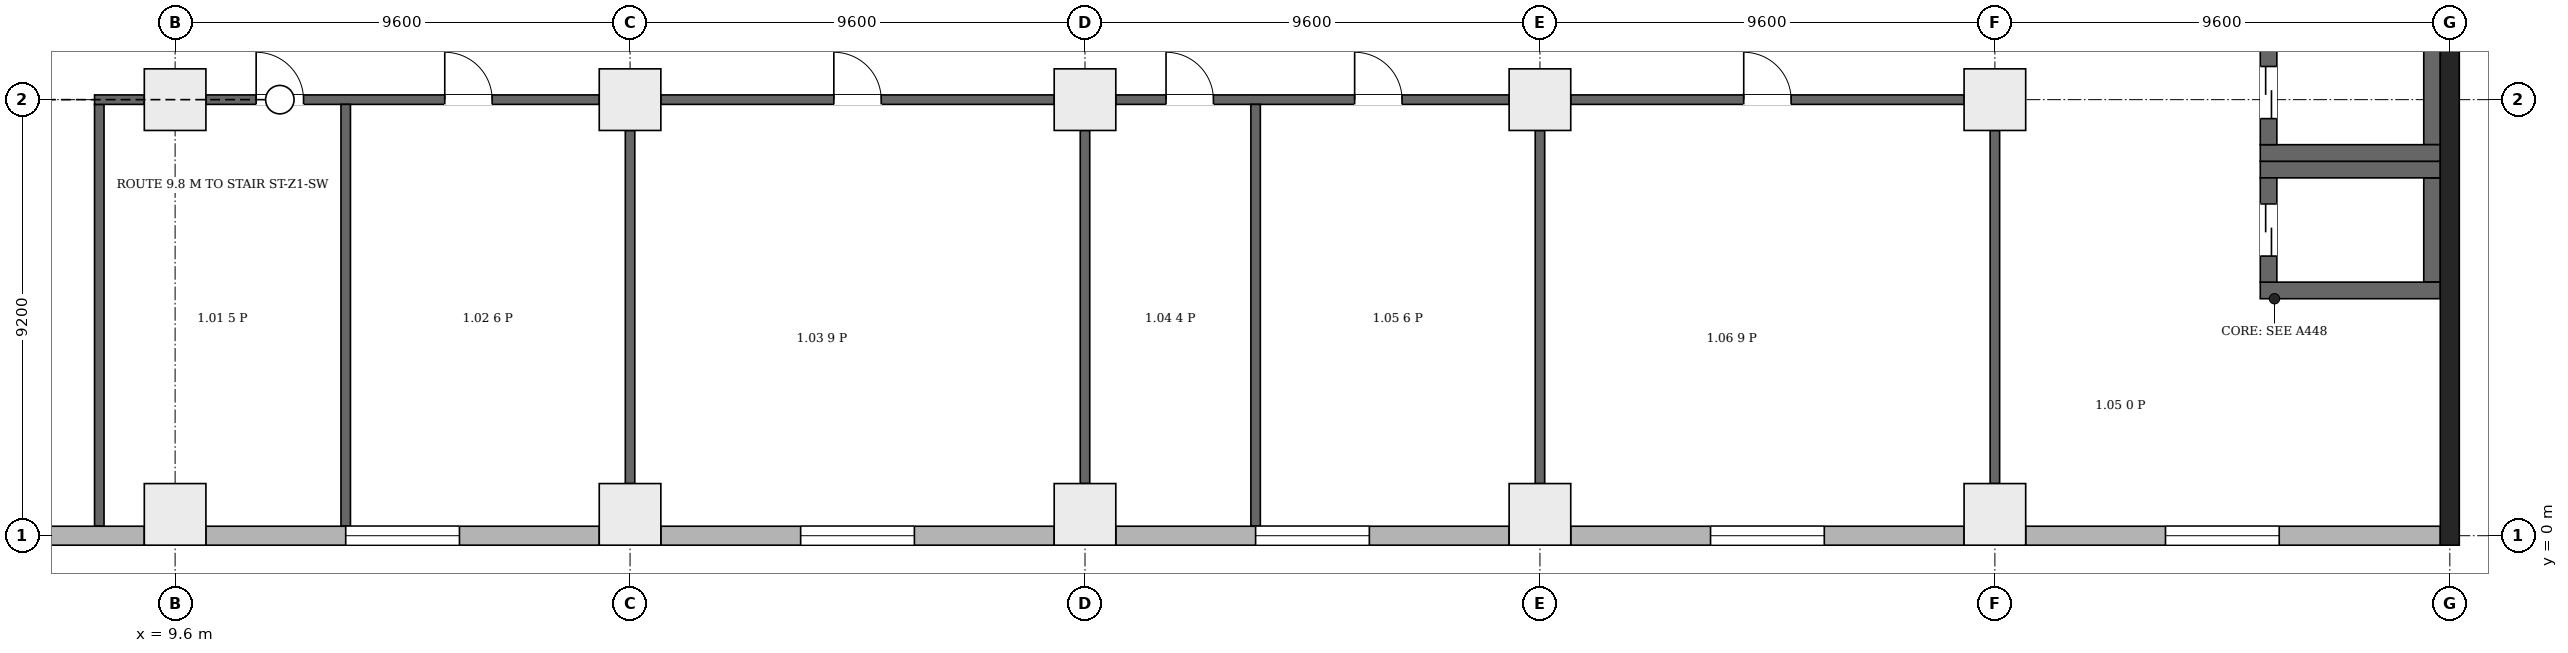
"""IFC4 building model, lengths in metres.
Left out: names, types, materials, properties, quantities, classifications, styles, units other than length and angle.
Written with IfcOpenShell. Run it as: python <this file> out.ifc"""

import sys

from ifc_helpers import new_model, si_unit, direction, frame, frame_2d, origin, origin_2d, place, context, subcontext, project, spatial, rectangle, extrude, element, fill, save


model = new_model("IFC4")
c1 = context("Model", 3, precision=1e-05, world=origin(), true_north=direction((0.0, 1.0)))
c2 = subcontext(c1, "Body", "Model", "MODEL_VIEW")
j1 = project(units=[si_unit("LENGTHUNIT", "METRE"), si_unit("PLANEANGLEUNIT", "RADIAN")], contexts=[c1])
p1 = place(None, origin())
s1 = spatial("IfcSite", under=j1, at=p1, CompositionType="ELEMENT")
p2 = place(p1, origin())
s2 = spatial("IfcBuilding", under=s1, at=p2, CompositionType="ELEMENT")
p3 = place(p2, frame((0.0, 0.0, 6.5)))
s3 = spatial("IfcBuildingStorey", under=s2, at=p3, CompositionType="ELEMENT", Elevation=6.5)
p4 = place(p3, frame((57.6, -0.2, 0.0), z_axis=(0.0, 0.0, 1.0), x_axis=(0.0, 1.0, 0.0)))
e1 = element("IfcWall", 1, at=p4, inside=s3, PredefinedType="SHEAR", context=c2, shape_type="SweptSolid", body=[
    extrude(rectangle(XDim=46.88, YDim=0.4, at=frame_2d((23.44, 0.0))), origin(), (0.0, 0.0, 1.0), 7.7),
])
for number, where, z_axis, x_axis in (
    (2, (53.6, 5.175, 0.0), (0.0, 0.0, 1.0), (1.0, 0.0, 0.0)),
    (3, (53.6, 7.725, 0.0), (0.0, 0.0, 1.0), (1.0, 0.0, 0.0)),
):
    element("IfcWall", number, at=place(p3, frame(where, z_axis=z_axis, x_axis=x_axis)), inside=s3, PredefinedType="SHEAR", context=c2, shape_type="SweptSolid", body=[
        extrude(rectangle(XDim=3.8, YDim=0.35, at=frame_2d((1.9, 0.0))), origin(), (0.0, 0.0, 1.0), 7.7),
    ])
p5 = place(p3, frame((53.775, 5.35, 0.0), z_axis=(0.0, 0.0, 1.0), x_axis=(0.0, 1.0, 0.0)))
e4 = element("IfcWall", 4, at=p5, inside=s3, PredefinedType="SHEAR", context=c2, shape_type="SweptSolid", body=[
    extrude(rectangle(XDim=2.2, YDim=0.35, at=frame_2d((1.1, 0.0))), origin(), (0.0, 0.0, 1.0), 7.7),
])
p6 = place(p5, frame((0.55, 0.0, 0.0)))
e5 = element("IfcOpeningElement", 5, at=p6, cuts=e4, PredefinedType="OPENING", context=c2, shape_type="SweptSolid", body=[
    extrude(rectangle(XDim=1.1, YDim=2.1, at=frame_2d((0.55, 1.05))), frame((0.0, 0.185, 0.0), z_axis=(0.0, -1.0, 0.0), x_axis=(1.0, 0.0, 0.0)), (0.0, 0.0, 1.0), 0.37),
])
p7 = place(p3, frame((57.225, 5.35, 0.0), z_axis=(0.0, 0.0, 1.0), x_axis=(0.0, 1.0, 0.0)))
e6 = element("IfcWall", 6, at=p7, inside=s3, PredefinedType="SHEAR", context=c2, shape_type="SweptSolid", body=[
    extrude(rectangle(XDim=2.2, YDim=0.35, at=frame_2d((1.1, 0.0))), origin(), (0.0, 0.0, 1.0), 7.7),
])
p8 = place(p3, frame((53.6, 8.075, 0.0), z_axis=(0.0, 0.0, 1.0), x_axis=(1.0, 0.0, 0.0)))
e7 = element("IfcWall", 7, at=p8, inside=s3, PredefinedType="SHEAR", context=c2, shape_type="SweptSolid", body=[
    extrude(rectangle(XDim=3.8, YDim=0.35, at=frame_2d((1.9, 0.0))), origin(), (0.0, 0.0, 1.0), 7.7),
])
p9 = place(p3, frame((53.775, 8.25, 0.0), z_axis=(0.0, 0.0, 1.0), x_axis=(0.0, 1.0, 0.0)))
e8 = element("IfcWall", 8, at=p9, inside=s3, PredefinedType="SHEAR", context=c2, shape_type="SweptSolid", body=[
    extrude(rectangle(XDim=2.2, YDim=0.35, at=frame_2d((1.1, 0.0))), origin(), (0.0, 0.0, 1.0), 7.7),
])
p10 = place(p9, frame((0.55, 0.0, 0.0)))
e9 = element("IfcOpeningElement", 9, at=p10, cuts=e8, PredefinedType="OPENING", context=c2, shape_type="SweptSolid", body=[
    extrude(rectangle(XDim=1.1, YDim=2.1, at=frame_2d((0.55, 1.05))), frame((0.0, 0.185, 0.0), z_axis=(0.0, -1.0, 0.0), x_axis=(1.0, 0.0, 0.0)), (0.0, 0.0, 1.0), 0.37),
])
p11 = place(p3, frame((57.225, 8.25, 0.0), z_axis=(0.0, 0.0, 1.0), x_axis=(0.0, 1.0, 0.0)))
e10 = element("IfcWall", 10, at=p11, inside=s3, PredefinedType="SHEAR", context=c2, shape_type="SweptSolid", body=[
    extrude(rectangle(XDim=2.2, YDim=0.35, at=frame_2d((1.1, 0.0))), origin(), (0.0, 0.0, 1.0), 7.7),
])
for number, where, z_axis, x_axis in (
    (11, (9.6, 0.45, 0.0), (0.0, 0.0, 1.0), (1.0, 0.0, 0.0)),
    (12, (19.2, 0.45, 0.0), (0.0, 0.0, 1.0), (1.0, 0.0, 0.0)),
    (13, (28.8, 0.45, 0.0), (0.0, 0.0, 1.0), (1.0, 0.0, 0.0)),
    (14, (38.4, 0.45, 0.0), (0.0, 0.0, 1.0), (1.0, 0.0, 0.0)),
    (15, (48.0, 0.45, 0.0), (0.0, 0.0, 1.0), (1.0, 0.0, 0.0)),
    (16, (9.6, 9.2, 0.0), (0.0, 0.0, 1.0), (1.0, 0.0, 0.0)),
    (17, (19.2, 9.2, 0.0), (0.0, 0.0, 1.0), (1.0, 0.0, 0.0)),
    (18, (28.8, 9.2, 0.0), (0.0, 0.0, 1.0), (1.0, 0.0, 0.0)),
    (19, (38.4, 9.2, 0.0), (0.0, 0.0, 1.0), (1.0, 0.0, 0.0)),
    (20, (48.0, 9.2, 0.0), (0.0, 0.0, 1.0), (1.0, 0.0, 0.0)),
):
    element("IfcColumn", number, at=place(p3, frame(where, z_axis=z_axis, x_axis=x_axis)), inside=s3, PredefinedType="COLUMN", context=c2, shape_type="SweptSolid", body=[
        extrude(rectangle(XDim=1.3, YDim=1.3, at=origin_2d()), origin(), (0.0, 0.0, 1.0), 7.7),
    ])
p12 = place(p3, frame((0.2, 0.0, 0.0), z_axis=(0.0, 0.0, 1.0), x_axis=(1.0, 0.0, 0.0)))
e21 = element("IfcWall", 21, at=p12, inside=s3, PredefinedType="ELEMENTEDWALL", context=c2, shape_type="SweptSolid", body=[
    extrude(rectangle(XDim=8.75, YDim=0.4, at=frame_2d((4.375, 0.0))), origin(), (0.0, 0.0, 1.0), 7.35),
])
p13 = place(p12, frame((3.4, 0.0, 1.0)))
e22 = element("IfcOpeningElement", 22, at=p13, cuts=e21, PredefinedType="OPENING", context=c2, shape_type="SweptSolid", body=[
    extrude(rectangle(XDim=2.4, YDim=2.2, at=frame_2d((1.2, 1.1))), frame((0.0, 0.21, 0.0), z_axis=(0.0, -1.0, 0.0), x_axis=(1.0, 0.0, 0.0)), (0.0, 0.0, 1.0), 0.42),
])
p14 = place(p3, frame((10.25, 0.0, 0.0), z_axis=(0.0, 0.0, 1.0), x_axis=(1.0, 0.0, 0.0)))
e23 = element("IfcWall", 23, at=p14, inside=s3, PredefinedType="ELEMENTEDWALL", context=c2, shape_type="SweptSolid", body=[
    extrude(rectangle(XDim=8.3, YDim=0.4, at=frame_2d((4.15, 0.0))), origin(), (0.0, 0.0, 1.0), 7.35),
])
p15 = place(p14, frame((2.95, 0.0, 1.0)))
e24 = element("IfcOpeningElement", 24, at=p15, cuts=e23, PredefinedType="OPENING", context=c2, shape_type="SweptSolid", body=[
    extrude(rectangle(XDim=2.4, YDim=2.2, at=frame_2d((1.2, 1.1))), frame((0.0, 0.21, 0.0), z_axis=(0.0, -1.0, 0.0), x_axis=(1.0, 0.0, 0.0)), (0.0, 0.0, 1.0), 0.42),
])
p16 = place(p3, frame((19.85, 0.0, 0.0), z_axis=(0.0, 0.0, 1.0), x_axis=(1.0, 0.0, 0.0)))
e25 = element("IfcWall", 25, at=p16, inside=s3, PredefinedType="ELEMENTEDWALL", context=c2, shape_type="SweptSolid", body=[
    extrude(rectangle(XDim=8.3, YDim=0.4, at=frame_2d((4.15, 0.0))), origin(), (0.0, 0.0, 1.0), 7.35),
])
p17 = place(p16, frame((2.95, 0.0, 1.0)))
e26 = element("IfcOpeningElement", 26, at=p17, cuts=e25, PredefinedType="OPENING", context=c2, shape_type="SweptSolid", body=[
    extrude(rectangle(XDim=2.4, YDim=2.2, at=frame_2d((1.2, 1.1))), frame((0.0, 0.21, 0.0), z_axis=(0.0, -1.0, 0.0), x_axis=(1.0, 0.0, 0.0)), (0.0, 0.0, 1.0), 0.42),
])
p18 = place(p3, frame((29.45, 0.0, 0.0), z_axis=(0.0, 0.0, 1.0), x_axis=(1.0, 0.0, 0.0)))
e27 = element("IfcWall", 27, at=p18, inside=s3, PredefinedType="ELEMENTEDWALL", context=c2, shape_type="SweptSolid", body=[
    extrude(rectangle(XDim=8.3, YDim=0.4, at=frame_2d((4.15, 0.0))), origin(), (0.0, 0.0, 1.0), 7.35),
])
p19 = place(p18, frame((2.95, 0.0, 1.0)))
e28 = element("IfcOpeningElement", 28, at=p19, cuts=e27, PredefinedType="OPENING", context=c2, shape_type="SweptSolid", body=[
    extrude(rectangle(XDim=2.4, YDim=2.2, at=frame_2d((1.2, 1.1))), frame((0.0, 0.21, 0.0), z_axis=(0.0, -1.0, 0.0), x_axis=(1.0, 0.0, 0.0)), (0.0, 0.0, 1.0), 0.42),
])
p20 = place(p3, frame((39.05, 0.0, 0.0), z_axis=(0.0, 0.0, 1.0), x_axis=(1.0, 0.0, 0.0)))
e29 = element("IfcWall", 29, at=p20, inside=s3, PredefinedType="ELEMENTEDWALL", context=c2, shape_type="SweptSolid", body=[
    extrude(rectangle(XDim=8.3, YDim=0.4, at=frame_2d((4.15, 0.0))), origin(), (0.0, 0.0, 1.0), 7.35),
])
p21 = place(p20, frame((2.95, 0.0, 1.0)))
e30 = element("IfcOpeningElement", 30, at=p21, cuts=e29, PredefinedType="OPENING", context=c2, shape_type="SweptSolid", body=[
    extrude(rectangle(XDim=2.4, YDim=2.2, at=frame_2d((1.2, 1.1))), frame((0.0, 0.21, 0.0), z_axis=(0.0, -1.0, 0.0), x_axis=(1.0, 0.0, 0.0)), (0.0, 0.0, 1.0), 0.42),
])
p22 = place(p3, frame((48.65, 0.0, 0.0), z_axis=(0.0, 0.0, 1.0), x_axis=(1.0, 0.0, 0.0)))
e31 = element("IfcWall", 31, at=p22, inside=s3, PredefinedType="ELEMENTEDWALL", context=c2, shape_type="SweptSolid", body=[
    extrude(rectangle(XDim=8.75, YDim=0.4, at=frame_2d((4.375, 0.0))), origin(), (0.0, 0.0, 1.0), 7.35),
])
p23 = place(p22, frame((2.95, 0.0, 1.0)))
e32 = element("IfcOpeningElement", 32, at=p23, cuts=e31, PredefinedType="OPENING", context=c2, shape_type="SweptSolid", body=[
    extrude(rectangle(XDim=2.4, YDim=2.2, at=frame_2d((1.2, 1.1))), frame((0.0, 0.21, 0.0), z_axis=(0.0, -1.0, 0.0), x_axis=(1.0, 0.0, 0.0)), (0.0, 0.0, 1.0), 0.42),
])
p24 = place(p3, frame((8.0, 0.206, 0.0), z_axis=(0.0, 0.0, 1.0), x_axis=(0.0, 1.0, 0.0)))
e33 = element("IfcWall", 33, at=p24, inside=s3, PredefinedType="PARTITIONING", context=c2, shape_type="SweptSolid", body=[
    extrude(rectangle(XDim=8.894, YDim=0.2, at=frame_2d((4.447, 0.0))), origin(), (0.0, 0.0, 1.0), 7.35),
])
p25 = place(p3, frame((7.9, 9.2, 0.0), z_axis=(0.0, 0.0, 1.0), x_axis=(1.0, 0.0, 0.0)))
e34 = element("IfcWall", 34, at=p25, inside=s3, PredefinedType="PARTITIONING", context=c2, shape_type="SweptSolid", body=[
    extrude(rectangle(XDim=1.05, YDim=0.2, at=frame_2d((0.525, 0.0))), origin(), (0.0, 0.0, 1.0), 6.95),
])
p26 = place(p3, frame((10.25, 9.2, 0.0), z_axis=(0.0, 0.0, 1.0), x_axis=(1.0, 0.0, 0.0)))
e35 = element("IfcWall", 35, at=p26, inside=s3, PredefinedType="PARTITIONING", context=c2, shape_type="SweptSolid", body=[
    extrude(rectangle(XDim=8.3, YDim=0.2, at=frame_2d((4.15, 0.0))), origin(), (0.0, 0.0, 1.0), 6.95),
])
p27 = place(p26, frame((1.06, 0.0, 0.0)))
e36 = element("IfcOpeningElement", 36, at=p27, cuts=e35, PredefinedType="OPENING", context=c2, shape_type="SweptSolid", body=[
    extrude(rectangle(XDim=1.0, YDim=2.1, at=frame_2d((0.5, 1.05))), frame((0.0, 0.11, 0.0), z_axis=(0.0, -1.0, 0.0), x_axis=(1.0, 0.0, 0.0)), (0.0, 0.0, 1.0), 0.22),
])
p28 = place(p26, frame((5.04, 0.0, 0.0)))
e37 = element("IfcOpeningElement", 37, at=p28, cuts=e35, PredefinedType="OPENING", context=c2, shape_type="SweptSolid", body=[
    extrude(rectangle(XDim=1.0, YDim=2.1, at=frame_2d((0.5, 1.05))), frame((0.0, 0.11, 0.0), z_axis=(0.0, -1.0, 0.0), x_axis=(1.0, 0.0, 0.0)), (0.0, 0.0, 1.0), 0.22),
])
p29 = place(p3, frame((13.2, 0.206, 0.0), z_axis=(0.0, 0.0, 1.0), x_axis=(0.0, 1.0, 0.0)))
e38 = element("IfcWall", 38, at=p29, inside=s3, PredefinedType="PARTITIONING", context=c2, shape_type="SweptSolid", body=[
    extrude(rectangle(XDim=8.894, YDim=0.2, at=frame_2d((4.447, 0.0))), origin(), (0.0, 0.0, 1.0), 7.35),
])
p30 = place(p3, frame((19.2, 1.1, 0.0), z_axis=(0.0, 0.0, 1.0), x_axis=(0.0, 1.0, 0.0)))
e39 = element("IfcWall", 39, at=p30, inside=s3, PredefinedType="PARTITIONING", context=c2, shape_type="SweptSolid", body=[
    extrude(rectangle(XDim=7.45, YDim=0.2, at=frame_2d((3.725, 0.0))), origin(), (0.0, 0.0, 1.0), 6.95),
])
p31 = place(p3, frame((19.85, 9.2, 0.0), z_axis=(0.0, 0.0, 1.0), x_axis=(1.0, 0.0, 0.0)))
e40 = element("IfcWall", 40, at=p31, inside=s3, PredefinedType="PARTITIONING", context=c2, shape_type="SweptSolid", body=[
    extrude(rectangle(XDim=8.3, YDim=0.2, at=frame_2d((4.15, 0.0))), origin(), (0.0, 0.0, 1.0), 6.95),
])
p32 = place(p31, frame((3.65, 0.0, 0.0)))
e41 = element("IfcOpeningElement", 41, at=p32, cuts=e40, PredefinedType="OPENING", context=c2, shape_type="SweptSolid", body=[
    extrude(rectangle(XDim=1.0, YDim=2.1, at=frame_2d((0.5, 1.05))), frame((0.0, 0.11, 0.0), z_axis=(0.0, -1.0, 0.0), x_axis=(1.0, 0.0, 0.0)), (0.0, 0.0, 1.0), 0.22),
])
p33 = place(p3, frame((28.8, 1.1, 0.0), z_axis=(0.0, 0.0, 1.0), x_axis=(0.0, 1.0, 0.0)))
e42 = element("IfcWall", 42, at=p33, inside=s3, PredefinedType="PARTITIONING", context=c2, shape_type="SweptSolid", body=[
    extrude(rectangle(XDim=7.45, YDim=0.2, at=frame_2d((3.725, 0.0))), origin(), (0.0, 0.0, 1.0), 6.95),
])
p34 = place(p3, frame((29.45, 9.2, 0.0), z_axis=(0.0, 0.0, 1.0), x_axis=(1.0, 0.0, 0.0)))
e43 = element("IfcWall", 43, at=p34, inside=s3, PredefinedType="PARTITIONING", context=c2, shape_type="SweptSolid", body=[
    extrude(rectangle(XDim=8.3, YDim=0.2, at=frame_2d((4.15, 0.0))), origin(), (0.0, 0.0, 1.0), 6.95),
])
p35 = place(p34, frame((1.06, 0.0, 0.0)))
e44 = element("IfcOpeningElement", 44, at=p35, cuts=e43, PredefinedType="OPENING", context=c2, shape_type="SweptSolid", body=[
    extrude(rectangle(XDim=1.0, YDim=2.1, at=frame_2d((0.5, 1.05))), frame((0.0, 0.11, 0.0), z_axis=(0.0, -1.0, 0.0), x_axis=(1.0, 0.0, 0.0)), (0.0, 0.0, 1.0), 0.22),
])
p36 = place(p34, frame((5.04, 0.0, 0.0)))
e45 = element("IfcOpeningElement", 45, at=p36, cuts=e43, PredefinedType="OPENING", context=c2, shape_type="SweptSolid", body=[
    extrude(rectangle(XDim=1.0, YDim=2.1, at=frame_2d((0.5, 1.05))), frame((0.0, 0.11, 0.0), z_axis=(0.0, -1.0, 0.0), x_axis=(1.0, 0.0, 0.0)), (0.0, 0.0, 1.0), 0.22),
])
p37 = place(p3, frame((32.4, 0.206, 0.0), z_axis=(0.0, 0.0, 1.0), x_axis=(0.0, 1.0, 0.0)))
e46 = element("IfcWall", 46, at=p37, inside=s3, PredefinedType="PARTITIONING", context=c2, shape_type="SweptSolid", body=[
    extrude(rectangle(XDim=8.894, YDim=0.2, at=frame_2d((4.447, 0.0))), origin(), (0.0, 0.0, 1.0), 7.35),
])
p38 = place(p3, frame((38.4, 1.1, 0.0), z_axis=(0.0, 0.0, 1.0), x_axis=(0.0, 1.0, 0.0)))
e47 = element("IfcWall", 47, at=p38, inside=s3, PredefinedType="PARTITIONING", context=c2, shape_type="SweptSolid", body=[
    extrude(rectangle(XDim=7.45, YDim=0.2, at=frame_2d((3.725, 0.0))), origin(), (0.0, 0.0, 1.0), 6.95),
])
p39 = place(p3, frame((39.05, 9.2, 0.0), z_axis=(0.0, 0.0, 1.0), x_axis=(1.0, 0.0, 0.0)))
e48 = element("IfcWall", 48, at=p39, inside=s3, PredefinedType="PARTITIONING", context=c2, shape_type="SweptSolid", body=[
    extrude(rectangle(XDim=8.3, YDim=0.2, at=frame_2d((4.15, 0.0))), origin(), (0.0, 0.0, 1.0), 6.95),
])
p40 = place(p39, frame((3.65, 0.0, 0.0)))
e49 = element("IfcOpeningElement", 49, at=p40, cuts=e48, PredefinedType="OPENING", context=c2, shape_type="SweptSolid", body=[
    extrude(rectangle(XDim=1.0, YDim=2.1, at=frame_2d((0.5, 1.05))), frame((0.0, 0.11, 0.0), z_axis=(0.0, -1.0, 0.0), x_axis=(1.0, 0.0, 0.0)), (0.0, 0.0, 1.0), 0.22),
])
p41 = place(p3, frame((48.0, 1.1, 0.0), z_axis=(0.0, 0.0, 1.0), x_axis=(0.0, 1.0, 0.0)))
e50 = element("IfcWall", 50, at=p41, inside=s3, PredefinedType="PARTITIONING", context=c2, shape_type="SweptSolid", body=[
    extrude(rectangle(XDim=7.45, YDim=0.2, at=frame_2d((3.725, 0.0))), origin(), (0.0, 0.0, 1.0), 6.95),
])
p42 = place(p15, origin())
e51 = element("IfcWindow", 51, at=p42, inside=s3, PartitioningType="SINGLE_PANEL", PredefinedType="WINDOW", context=c2, shape_type="SweptSolid", body=[
    extrude(rectangle(XDim=2.4, YDim=2.2, at=frame_2d((1.2, 1.1))), frame((0.0, 0.03, 0.0), z_axis=(0.0, -1.0, 0.0), x_axis=(1.0, 0.0, 0.0)), (0.0, 0.0, 1.0), 0.06),
])
fill(e24, e51)
p43 = place(p17, origin())
e52 = element("IfcWindow", 52, at=p43, inside=s3, PartitioningType="SINGLE_PANEL", PredefinedType="WINDOW", context=c2, shape_type="SweptSolid", body=[
    extrude(rectangle(XDim=2.4, YDim=2.2, at=frame_2d((1.2, 1.1))), frame((0.0, 0.03, 0.0), z_axis=(0.0, -1.0, 0.0), x_axis=(1.0, 0.0, 0.0)), (0.0, 0.0, 1.0), 0.06),
])
fill(e26, e52)
p44 = place(p19, origin())
e53 = element("IfcWindow", 53, at=p44, inside=s3, PartitioningType="SINGLE_PANEL", PredefinedType="WINDOW", context=c2, shape_type="SweptSolid", body=[
    extrude(rectangle(XDim=2.4, YDim=2.2, at=frame_2d((1.2, 1.1))), frame((0.0, 0.03, 0.0), z_axis=(0.0, -1.0, 0.0), x_axis=(1.0, 0.0, 0.0)), (0.0, 0.0, 1.0), 0.06),
])
fill(e28, e53)
p45 = place(p21, origin())
e54 = element("IfcWindow", 54, at=p45, inside=s3, PartitioningType="SINGLE_PANEL", PredefinedType="WINDOW", context=c2, shape_type="SweptSolid", body=[
    extrude(rectangle(XDim=2.4, YDim=2.2, at=frame_2d((1.2, 1.1))), frame((0.0, 0.03, 0.0), z_axis=(0.0, -1.0, 0.0), x_axis=(1.0, 0.0, 0.0)), (0.0, 0.0, 1.0), 0.06),
])
fill(e30, e54)
p46 = place(p23, origin())
e55 = element("IfcWindow", 55, at=p46, inside=s3, PartitioningType="SINGLE_PANEL", PredefinedType="WINDOW", context=c2, shape_type="SweptSolid", body=[
    extrude(rectangle(XDim=2.4, YDim=2.2, at=frame_2d((1.2, 1.1))), frame((0.0, 0.03, 0.0), z_axis=(0.0, -1.0, 0.0), x_axis=(1.0, 0.0, 0.0)), (0.0, 0.0, 1.0), 0.06),
])
fill(e32, e55)
p47 = place(p6, origin())
e56 = element("IfcDoor", 56, at=p47, inside=s3, OperationType="DOUBLE_DOOR_SLIDING", PredefinedType="DOOR", context=c2, shape_type="SweptSolid", body=[
    extrude(rectangle(XDim=1.1, YDim=2.1, at=frame_2d((0.55, 1.05))), frame((0.0, 0.025, 0.0), z_axis=(0.0, -1.0, 0.0), x_axis=(1.0, 0.0, 0.0)), (0.0, 0.0, 1.0), 0.05),
])
fill(e5, e56)
p48 = place(p10, origin())
e57 = element("IfcDoor", 57, at=p48, inside=s3, OperationType="DOUBLE_DOOR_SLIDING", PredefinedType="DOOR", context=c2, shape_type="SweptSolid", body=[
    extrude(rectangle(XDim=1.1, YDim=2.1, at=frame_2d((0.55, 1.05))), frame((0.0, 0.025, 0.0), z_axis=(0.0, -1.0, 0.0), x_axis=(1.0, 0.0, 0.0)), (0.0, 0.0, 1.0), 0.05),
])
fill(e9, e57)
p49 = place(p27, origin())
e58 = element("IfcDoor", 58, at=p49, inside=s3, OperationType="SINGLE_SWING_LEFT", PredefinedType="DOOR", context=c2, shape_type="SweptSolid", body=[
    extrude(rectangle(XDim=1.0, YDim=2.1, at=frame_2d((0.5, 1.05))), frame((0.0, 0.025, 0.0), z_axis=(0.0, -1.0, 0.0), x_axis=(1.0, 0.0, 0.0)), (0.0, 0.0, 1.0), 0.05),
])
fill(e36, e58)
p50 = place(p28, origin())
e59 = element("IfcDoor", 59, at=p50, inside=s3, OperationType="SINGLE_SWING_RIGHT", PredefinedType="DOOR", context=c2, shape_type="SweptSolid", body=[
    extrude(rectangle(XDim=1.0, YDim=2.1, at=frame_2d((0.5, 1.05))), frame((0.0, 0.025, 0.0), z_axis=(0.0, -1.0, 0.0), x_axis=(1.0, 0.0, 0.0)), (0.0, 0.0, 1.0), 0.05),
])
fill(e37, e59)
p51 = place(p32, origin())
e60 = element("IfcDoor", 60, at=p51, inside=s3, OperationType="SINGLE_SWING_LEFT", PredefinedType="DOOR", context=c2, shape_type="SweptSolid", body=[
    extrude(rectangle(XDim=1.0, YDim=2.1, at=frame_2d((0.5, 1.05))), frame((0.0, 0.025, 0.0), z_axis=(0.0, -1.0, 0.0), x_axis=(1.0, 0.0, 0.0)), (0.0, 0.0, 1.0), 0.05),
])
fill(e41, e60)
p52 = place(p35, origin())
e61 = element("IfcDoor", 61, at=p52, inside=s3, OperationType="SINGLE_SWING_LEFT", PredefinedType="DOOR", context=c2, shape_type="SweptSolid", body=[
    extrude(rectangle(XDim=1.0, YDim=2.1, at=frame_2d((0.5, 1.05))), frame((0.0, 0.025, 0.0), z_axis=(0.0, -1.0, 0.0), x_axis=(1.0, 0.0, 0.0)), (0.0, 0.0, 1.0), 0.05),
])
fill(e44, e61)
p53 = place(p36, origin())
e62 = element("IfcDoor", 62, at=p53, inside=s3, OperationType="SINGLE_SWING_RIGHT", PredefinedType="DOOR", context=c2, shape_type="SweptSolid", body=[
    extrude(rectangle(XDim=1.0, YDim=2.1, at=frame_2d((0.5, 1.05))), frame((0.0, 0.025, 0.0), z_axis=(0.0, -1.0, 0.0), x_axis=(1.0, 0.0, 0.0)), (0.0, 0.0, 1.0), 0.05),
])
fill(e45, e62)
p54 = place(p40, origin())
e63 = element("IfcDoor", 63, at=p54, inside=s3, OperationType="SINGLE_SWING_RIGHT", PredefinedType="DOOR", context=c2, shape_type="SweptSolid", body=[
    extrude(rectangle(XDim=1.0, YDim=2.1, at=frame_2d((0.5, 1.05))), frame((0.0, 0.025, 0.0), z_axis=(0.0, -1.0, 0.0), x_axis=(1.0, 0.0, 0.0)), (0.0, 0.0, 1.0), 0.05),
])
fill(e49, e63)
save(model, sys.argv[1])
